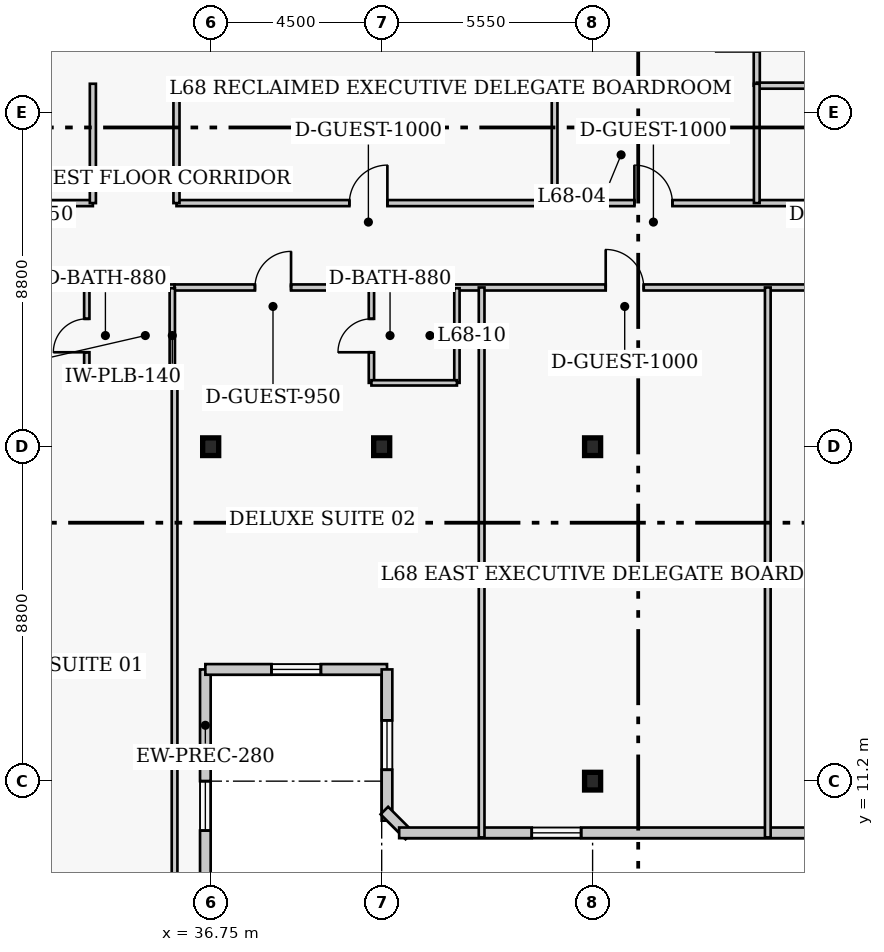
"""IFC4 building model, lengths in metres.
Left out: names, types, materials, properties, quantities, classifications, styles, units other than length and angle.
Written with IfcOpenShell. Run it as: python <this file> out.ifc"""

import sys

from ifc_helpers import new_model, si_unit, direction, frame, frame_2d, origin, origin_2d, place, context, subcontext, project, spatial, rectangle, i_section, extrude, element, fill, save


model = new_model("IFC4")
c1 = context("Model", 3, precision=1e-05, world=origin(), true_north=direction((0.0, 1.0)))
c2 = subcontext(c1, "Body", "Model", "MODEL_VIEW")
j1 = project(units=[si_unit("LENGTHUNIT", "METRE"), si_unit("PLANEANGLEUNIT", "RADIAN")], contexts=[c1])
p1 = place(None, origin())
s1 = spatial("IfcSite", under=j1, at=p1, CompositionType="ELEMENT")
p2 = place(p1, origin())
s2 = spatial("IfcBuilding", under=s1, at=p2, CompositionType="ELEMENT")
p3 = place(p2, frame((0.0, 0.0, 273.4)))
s3 = spatial("IfcBuildingStorey", under=s2, at=p3, CompositionType="ELEMENT", Elevation=273.4)
for number, where, z_axis, x_axis in (
    (1, (36.75, 20.0, 0.0), (0.0, 0.0, 1.0), (1.0, 0.0, 0.0)),
    (2, (41.25, 20.0, 0.0), (0.0, 0.0, 1.0), (1.0, 0.0, 0.0)),
    (3, (46.8, 11.2, 0.0), (0.0, 0.0, 1.0), (1.0, 0.0, 0.0)),
    (4, (46.8, 20.0, 0.0), (0.0, 0.0, 1.0), (1.0, 0.0, 0.0)),
):
    element("IfcColumn", number, at=place(p3, frame(where, z_axis=z_axis, x_axis=x_axis)), inside=s3, PredefinedType="COLUMN", context=c2, shape_type="SweptSolid", body=[
        extrude(i_section(OverallWidth=0.422, OverallDepth=0.465, WebThickness=0.045, FlangeThickness=0.073, FilletRadius=0.017, at=origin_2d()), origin(), (0.0, 0.0, 1.0), 4.0),
    ])
p4 = place(p3, frame((36.61, 6.96, 0.0), z_axis=(0.0, 0.0, 1.0), x_axis=(0.0, 1.0, 0.0)))
e5 = element("IfcWall", 5, at=p4, inside=s3, PredefinedType="SOLIDWALL", context=c2, shape_type="SweptSolid", body=[
    extrude(rectangle(XDim=7.18, YDim=0.28, at=frame_2d((3.59, 0.0))), origin(), (0.0, 0.0, 1.0), 3.76),
])
p5 = place(p4, frame((2.94, 0.0, 0.85)))
e6 = element("IfcOpeningElement", 6, at=p5, cuts=e5, PredefinedType="OPENING", context=c2, shape_type="SweptSolid", body=[
    extrude(rectangle(XDim=1.3, YDim=1.7, at=frame_2d((0.65, 0.85))), frame((0.0, 0.15, 0.0), z_axis=(0.0, -1.0, 0.0), x_axis=(1.0, 0.0, 0.0)), (0.0, 0.0, 1.0), 0.3),
])
p6 = place(p3, frame((36.61, 14.14, 0.0), z_axis=(0.0, 0.0, 1.0), x_axis=(1.0, 0.0, 0.0)))
e7 = element("IfcWall", 7, at=p6, inside=s3, PredefinedType="SOLIDWALL", context=c2, shape_type="SweptSolid", body=[
    extrude(rectangle(XDim=4.78, YDim=0.28, at=frame_2d((2.39, 0.0))), origin(), (0.0, 0.0, 1.0), 3.76),
])
p7 = place(p6, frame((1.74, 0.0, 0.85)))
e8 = element("IfcOpeningElement", 8, at=p7, cuts=e7, PredefinedType="OPENING", context=c2, shape_type="SweptSolid", body=[
    extrude(rectangle(XDim=1.3, YDim=1.7, at=frame_2d((0.65, 0.85))), frame((0.0, 0.15, 0.0), z_axis=(0.0, -1.0, 0.0), x_axis=(1.0, 0.0, 0.0)), (0.0, 0.0, 1.0), 0.3),
])
p8 = place(p3, frame((41.39, 14.14, 0.0), z_axis=(0.0, 0.0, 1.0), x_axis=(0.0, -1.0, 0.0)))
e9 = element("IfcWall", 9, at=p8, inside=s3, PredefinedType="SOLIDWALL", context=c2, shape_type="SweptSolid", body=[
    extrude(rectangle(XDim=3.98, YDim=0.28, at=frame_2d((1.99, 0.0))), origin(), (0.0, 0.0, 1.0), 3.76),
])
p9 = place(p8, frame((1.34, 0.0, 0.85)))
e10 = element("IfcOpeningElement", 10, at=p9, cuts=e9, PredefinedType="OPENING", context=c2, shape_type="SweptSolid", body=[
    extrude(rectangle(XDim=1.3, YDim=1.7, at=frame_2d((0.65, 0.85))), frame((0.0, 0.15, 0.0), z_axis=(0.0, -1.0, 0.0), x_axis=(1.0, 0.0, 0.0)), (0.0, 0.0, 1.0), 0.3),
])
p10 = place(p3, frame((41.321, 10.427, 0.0), z_axis=(0.0, 0.0, 1.0), x_axis=(0.707106781187, -0.707106781187, 0.0)))
e11 = element("IfcWall", 11, at=p10, inside=s3, PredefinedType="SOLIDWALL", context=c2, shape_type="SweptSolid", body=[
    extrude(rectangle(XDim=0.928, YDim=0.28, at=frame_2d((0.464, 0.0))), origin(), (0.0, 0.0, 1.0), 3.76),
])
p11 = place(p3, frame((41.71, 9.84, 0.0), z_axis=(0.0, 0.0, 1.0), x_axis=(1.0, 0.0, 0.0)))
e12 = element("IfcWall", 12, at=p11, inside=s3, PredefinedType="SOLIDWALL", context=c2, shape_type="SweptSolid", body=[
    extrude(rectangle(XDim=24.83, YDim=0.28, at=frame_2d((12.415, 0.0))), origin(), (0.0, 0.0, 1.0), 3.76),
])
p12 = place(p11, frame((3.488, 0.0, 0.85)))
e13 = element("IfcOpeningElement", 13, at=p12, cuts=e12, PredefinedType="OPENING", context=c2, shape_type="SweptSolid", body=[
    extrude(rectangle(XDim=1.3, YDim=1.7, at=frame_2d((0.65, 0.85))), frame((0.0, 0.15, 0.0), z_axis=(0.0, -1.0, 0.0), x_axis=(1.0, 0.0, 0.0)), (0.0, 0.0, 1.0), 0.3),
])
p13 = place(p11, frame((11.115, 0.0, 0.85)))
e14 = element("IfcOpeningElement", 14, at=p13, cuts=e12, PredefinedType="OPENING", context=c2, shape_type="SweptSolid", body=[
    extrude(rectangle(XDim=1.3, YDim=1.7, at=frame_2d((0.65, 0.85))), frame((0.0, 0.15, 0.0), z_axis=(0.0, -1.0, 0.0), x_axis=(1.0, 0.0, 0.0)), (0.0, 0.0, 1.0), 0.3),
])
p14 = place(p11, frame((18.892, 0.0, 0.85)))
e15 = element("IfcOpeningElement", 15, at=p14, cuts=e12, PredefinedType="OPENING", context=c2, shape_type="SweptSolid", body=[
    extrude(rectangle(XDim=1.3, YDim=1.7, at=frame_2d((0.65, 0.85))), frame((0.0, 0.15, 0.0), z_axis=(0.0, -1.0, 0.0), x_axis=(1.0, 0.0, 0.0)), (0.0, 0.0, 1.0), 0.3),
])
p15 = place(p3, frame((51.12, 29.5, 0.0), z_axis=(0.0, 0.0, 1.0), x_axis=(0.0, 1.0, 0.0)))
e16 = element("IfcWall", 16, at=p15, inside=s3, PredefinedType="PARTITIONING", context=c2, shape_type="SweptSolid", body=[
    extrude(rectangle(XDim=3.7, YDim=0.16, at=frame_2d((1.85, 0.0))), origin(), (0.0, 0.0, 1.0), 3.76),
])
p16 = place(p15, frame((0.9, 0.0, 0.0)))
e17 = element("IfcOpeningElement", 17, at=p16, cuts=e16, PredefinedType="OPENING", context=c2, shape_type="SweptSolid", body=[
    extrude(rectangle(XDim=1.1, YDim=2.15, at=frame_2d((0.55, 1.075))), frame((0.0, 0.09, 0.0), z_axis=(0.0, -1.0, 0.0), x_axis=(1.0, 0.0, 0.0)), (0.0, 0.0, 1.0), 0.18),
])
p17 = place(p3, frame((51.12, 29.5, 0.0), z_axis=(0.0, 0.0, 1.0), x_axis=(1.0, 0.0, 0.0)))
e18 = element("IfcWall", 18, at=p17, inside=s3, PredefinedType="PARTITIONING", context=c2, shape_type="SweptSolid", body=[
    extrude(rectangle(XDim=5.63, YDim=0.16, at=frame_2d((2.815, 0.0))), origin(), (0.0, 0.0, 1.0), 3.76),
])
p18 = place(p3, frame((20.4, 26.41, 0.0), z_axis=(0.0, 0.0, 1.0), x_axis=(1.0, 0.0, 0.0)))
e19 = element("IfcWall", 19, at=p18, inside=s3, PredefinedType="PARTITIONING", context=c2, shape_type="SweptSolid", body=[
    extrude(rectangle(XDim=13.25, YDim=0.16, at=frame_2d((6.625, 0.0))), origin(), (0.0, 0.0, 1.0), 3.76),
])
p19 = place(p18, frame((6.25, 0.0, 0.0)))
e20 = element("IfcOpeningElement", 20, at=p19, cuts=e19, PredefinedType="OPENING", context=c2, shape_type="SweptSolid", body=[
    extrude(rectangle(XDim=1.0, YDim=2.15, at=frame_2d((0.5, 1.075))), frame((0.0, 0.09, 0.0), z_axis=(0.0, -1.0, 0.0), x_axis=(1.0, 0.0, 0.0)), (0.0, 0.0, 1.0), 0.18),
])
p20 = place(p3, frame((35.85, 26.41, 0.0), z_axis=(0.0, 0.0, 1.0), x_axis=(1.0, 0.0, 0.0)))
e21 = element("IfcWall", 21, at=p20, inside=s3, PredefinedType="PARTITIONING", context=c2, shape_type="SweptSolid", body=[
    extrude(rectangle(XDim=22.6, YDim=0.16, at=frame_2d((11.3, 0.0))), origin(), (0.0, 0.0, 1.0), 3.76),
])
p21 = place(p20, frame((4.55, 0.0, 0.0)))
e22 = element("IfcOpeningElement", 22, at=p21, cuts=e21, PredefinedType="OPENING", context=c2, shape_type="SweptSolid", body=[
    extrude(rectangle(XDim=1.0, YDim=2.15, at=frame_2d((0.5, 1.075))), frame((0.0, 0.09, 0.0), z_axis=(0.0, -1.0, 0.0), x_axis=(1.0, 0.0, 0.0)), (0.0, 0.0, 1.0), 0.18),
])
p22 = place(p20, frame((12.05, 0.0, 0.0)))
e23 = element("IfcOpeningElement", 23, at=p22, cuts=e21, PredefinedType="OPENING", context=c2, shape_type="SweptSolid", body=[
    extrude(rectangle(XDim=1.0, YDim=2.15, at=frame_2d((0.5, 1.075))), frame((0.0, 0.09, 0.0), z_axis=(0.0, -1.0, 0.0), x_axis=(1.0, 0.0, 0.0)), (0.0, 0.0, 1.0), 0.18),
])
for number, where, z_axis, x_axis in (
    (24, (33.65, 26.41, 0.0), (0.0, 0.0, 1.0), (0.0, 1.0, 0.0)),
    (25, (35.85, 26.41, 0.0), (0.0, 0.0, 1.0), (0.0, 1.0, 0.0)),
):
    element("IfcWall", number, at=place(p3, frame(where, z_axis=z_axis, x_axis=x_axis)), inside=s3, PredefinedType="PARTITIONING", context=c2, shape_type="SweptSolid", body=[
        extrude(rectangle(XDim=3.14, YDim=0.16, at=frame_2d((1.57, 0.0))), origin(), (0.0, 0.0, 1.0), 3.76),
    ])
p23 = place(p3, frame((20.4, 24.19, 0.0), z_axis=(0.0, 0.0, 1.0), x_axis=(1.0, 0.0, 0.0)))
e26 = element("IfcWall", 26, at=p23, inside=s3, PredefinedType="PARTITIONING", context=c2, shape_type="SweptSolid", body=[
    extrude(rectangle(XDim=15.4, YDim=0.16, at=frame_2d((7.7, 0.0))), origin(), (0.0, 0.0, 1.0), 3.76),
])
p24 = place(p23, frame((3.945, 0.0, 0.0)))
e27 = element("IfcOpeningElement", 27, at=p24, cuts=e26, PredefinedType="OPENING", context=c2, shape_type="SweptSolid", body=[
    extrude(rectangle(XDim=1.0, YDim=2.15, at=frame_2d((0.5, 1.075))), frame((0.0, 0.09, 0.0), z_axis=(0.0, -1.0, 0.0), x_axis=(1.0, 0.0, 0.0)), (0.0, 0.0, 1.0), 0.18),
])
p25 = place(p23, frame((10.485, 0.0, 0.0)))
e28 = element("IfcOpeningElement", 28, at=p25, cuts=e26, PredefinedType="OPENING", context=c2, shape_type="SweptSolid", body=[
    extrude(rectangle(XDim=0.95, YDim=2.1, at=frame_2d((0.475, 1.05))), frame((0.0, 0.09, 0.0), z_axis=(0.0, -1.0, 0.0), x_axis=(1.0, 0.0, 0.0)), (0.0, 0.0, 1.0), 0.18),
])
p26 = place(p3, frame((35.8, 24.19, 0.0), z_axis=(0.0, 0.0, 1.0), x_axis=(1.0, 0.0, 0.0)))
e29 = element("IfcWall", 29, at=p26, inside=s3, PredefinedType="PARTITIONING", context=c2, shape_type="SweptSolid", body=[
    extrude(rectangle(XDim=24.81, YDim=0.16, at=frame_2d((12.405, 0.0))), origin(), (0.0, 0.0, 1.0), 3.76),
])
p27 = place(p26, frame((2.115, 0.0, 0.0)))
e30 = element("IfcOpeningElement", 30, at=p27, cuts=e29, PredefinedType="OPENING", context=c2, shape_type="SweptSolid", body=[
    extrude(rectangle(XDim=0.95, YDim=2.1, at=frame_2d((0.475, 1.05))), frame((0.0, 0.09, 0.0), z_axis=(0.0, -1.0, 0.0), x_axis=(1.0, 0.0, 0.0)), (0.0, 0.0, 1.0), 0.18),
])
p28 = place(p26, frame((11.345, 0.0, 0.0)))
e31 = element("IfcOpeningElement", 31, at=p28, cuts=e29, PredefinedType="OPENING", context=c2, shape_type="SweptSolid", body=[
    extrude(rectangle(XDim=1.0, YDim=2.15, at=frame_2d((0.5, 1.075))), frame((0.0, 0.09, 0.0), z_axis=(0.0, -1.0, 0.0), x_axis=(1.0, 0.0, 0.0)), (0.0, 0.0, 1.0), 0.18),
])
p29 = place(p26, frame((17.47, 0.0, 0.0)))
e32 = element("IfcOpeningElement", 32, at=p29, cuts=e29, PredefinedType="OPENING", context=c2, shape_type="SweptSolid", body=[
    extrude(rectangle(XDim=0.95, YDim=2.1, at=frame_2d((0.475, 1.05))), frame((0.0, 0.09, 0.0), z_axis=(0.0, -1.0, 0.0), x_axis=(1.0, 0.0, 0.0)), (0.0, 0.0, 1.0), 0.18),
])
p30 = place(p26, frame((23.265, 0.0, 0.0)))
e33 = element("IfcOpeningElement", 33, at=p30, cuts=e29, PredefinedType="OPENING", context=c2, shape_type="SweptSolid", body=[
    extrude(rectangle(XDim=0.95, YDim=2.1, at=frame_2d((0.475, 1.05))), frame((0.0, 0.09, 0.0), z_axis=(0.0, -1.0, 0.0), x_axis=(1.0, 0.0, 0.0)), (0.0, 0.0, 1.0), 0.18),
])
for number, where, z_axis, x_axis in (
    (34, (45.8, 26.41, 0.0), (0.0, 0.0, 1.0), (0.0, 1.0, 0.0)),
    (35, (51.12, 26.41, 0.0), (0.0, 0.0, 1.0), (0.0, 1.0, 0.0)),
):
    element("IfcWall", number, at=place(p3, frame(where, z_axis=z_axis, x_axis=x_axis)), inside=s3, PredefinedType="PARTITIONING", context=c2, shape_type="SweptSolid", body=[
        extrude(rectangle(XDim=3.14, YDim=0.15, at=frame_2d((1.57, 0.0))), origin(), (0.0, 0.0, 1.0), 3.76),
    ])
p31 = place(p3, frame((33.49, 21.68, 0.0), z_axis=(0.0, 0.0, 1.0), x_axis=(0.0, 1.0, 0.0)))
e36 = element("IfcWall", 36, at=p31, inside=s3, PredefinedType="PLUMBINGWALL", context=c2, shape_type="SweptSolid", body=[
    extrude(rectangle(XDim=2.49, YDim=0.14, at=frame_2d((1.245, 0.0))), origin(), (0.0, 0.0, 1.0), 3.76),
])
p32 = place(p31, frame((0.805, 0.0, 0.0)))
e37 = element("IfcOpeningElement", 37, at=p32, cuts=e36, PredefinedType="OPENING", context=c2, shape_type="SweptSolid", body=[
    extrude(rectangle(XDim=0.88, YDim=2.05, at=frame_2d((0.44, 1.025))), frame((0.0, 0.08, 0.0), z_axis=(0.0, -1.0, 0.0), x_axis=(1.0, 0.0, 0.0)), (0.0, 0.0, 1.0), 0.16),
])
p33 = place(p3, frame((35.74, 21.68, 0.0), z_axis=(0.0, 0.0, 1.0), x_axis=(0.0, 1.0, 0.0)))
e38 = element("IfcWall", 38, at=p33, inside=s3, PredefinedType="PLUMBINGWALL", context=c2, shape_type="SweptSolid", body=[
    extrude(rectangle(XDim=2.49, YDim=0.14, at=frame_2d((1.245, 0.0))), origin(), (0.0, 0.0, 1.0), 3.76),
])
p34 = place(p3, frame((33.49, 21.68, 0.0), z_axis=(0.0, 0.0, 1.0), x_axis=(1.0, 0.0, 0.0)))
e39 = element("IfcWall", 39, at=p34, inside=s3, PredefinedType="PLUMBINGWALL", context=c2, shape_type="SweptSolid", body=[
    extrude(rectangle(XDim=2.25, YDim=0.14, at=frame_2d((1.125, 0.0))), origin(), (0.0, 0.0, 1.0), 3.76),
])
p35 = place(p3, frame((35.8, 6.52, 0.0), z_axis=(0.0, 0.0, 1.0), x_axis=(0.0, 1.0, 0.0)))
e40 = element("IfcWall", 40, at=p35, inside=s3, PredefinedType="PARTITIONING", context=c2, shape_type="SweptSolid", body=[
    extrude(rectangle(XDim=15.16, YDim=0.15, at=frame_2d((7.58, 0.0))), origin(), (0.0, 0.0, 1.0), 3.76),
])
p36 = place(p3, frame((40.98, 21.68, 0.0), z_axis=(0.0, 0.0, 1.0), x_axis=(0.0, 1.0, 0.0)))
e41 = element("IfcWall", 41, at=p36, inside=s3, PredefinedType="PLUMBINGWALL", context=c2, shape_type="SweptSolid", body=[
    extrude(rectangle(XDim=2.49, YDim=0.14, at=frame_2d((1.245, 0.0))), origin(), (0.0, 0.0, 1.0), 3.76),
])
p37 = place(p36, frame((0.805, 0.0, 0.0)))
e42 = element("IfcOpeningElement", 42, at=p37, cuts=e41, PredefinedType="OPENING", context=c2, shape_type="SweptSolid", body=[
    extrude(rectangle(XDim=0.88, YDim=2.05, at=frame_2d((0.44, 1.025))), frame((0.0, 0.08, 0.0), z_axis=(0.0, -1.0, 0.0), x_axis=(1.0, 0.0, 0.0)), (0.0, 0.0, 1.0), 0.16),
])
p38 = place(p3, frame((43.23, 21.68, 0.0), z_axis=(0.0, 0.0, 1.0), x_axis=(0.0, 1.0, 0.0)))
e43 = element("IfcWall", 43, at=p38, inside=s3, PredefinedType="PLUMBINGWALL", context=c2, shape_type="SweptSolid", body=[
    extrude(rectangle(XDim=2.49, YDim=0.14, at=frame_2d((1.245, 0.0))), origin(), (0.0, 0.0, 1.0), 3.76),
])
p39 = place(p3, frame((40.98, 21.68, 0.0), z_axis=(0.0, 0.0, 1.0), x_axis=(1.0, 0.0, 0.0)))
e44 = element("IfcWall", 44, at=p39, inside=s3, PredefinedType="PLUMBINGWALL", context=c2, shape_type="SweptSolid", body=[
    extrude(rectangle(XDim=2.25, YDim=0.14, at=frame_2d((1.125, 0.0))), origin(), (0.0, 0.0, 1.0), 3.76),
])
for number, where, z_axis, x_axis in (
    (45, (43.88, 9.72, 0.0), (0.0, 0.0, 1.0), (0.0, 1.0, 0.0)),
    (46, (51.41, 9.72, 0.0), (0.0, 0.0, 1.0), (0.0, 1.0, 0.0)),
):
    element("IfcWall", number, at=place(p3, frame(where, z_axis=z_axis, x_axis=x_axis)), inside=s3, PredefinedType="PARTITIONING", context=c2, shape_type="SweptSolid", body=[
        extrude(rectangle(XDim=14.47, YDim=0.15, at=frame_2d((7.235, 0.0))), origin(), (0.0, 0.0, 1.0), 3.76),
    ])
p40 = place(p5, origin())
e47 = element("IfcWindow", 47, at=p40, inside=s3, PartitioningType="SINGLE_PANEL", PredefinedType="WINDOW", context=c2, shape_type="SweptSolid", body=[
    extrude(rectangle(XDim=1.3, YDim=1.7, at=frame_2d((0.65, 0.85))), frame((0.0, 0.03, 0.0), z_axis=(0.0, -1.0, 0.0), x_axis=(1.0, 0.0, 0.0)), (0.0, 0.0, 1.0), 0.06),
])
fill(e6, e47)
p41 = place(p7, origin())
e48 = element("IfcWindow", 48, at=p41, inside=s3, PartitioningType="SINGLE_PANEL", PredefinedType="WINDOW", context=c2, shape_type="SweptSolid", body=[
    extrude(rectangle(XDim=1.3, YDim=1.7, at=frame_2d((0.65, 0.85))), frame((0.0, 0.03, 0.0), z_axis=(0.0, -1.0, 0.0), x_axis=(1.0, 0.0, 0.0)), (0.0, 0.0, 1.0), 0.06),
])
fill(e8, e48)
p42 = place(p9, origin())
e49 = element("IfcWindow", 49, at=p42, inside=s3, PartitioningType="SINGLE_PANEL", PredefinedType="WINDOW", context=c2, shape_type="SweptSolid", body=[
    extrude(rectangle(XDim=1.3, YDim=1.7, at=frame_2d((0.65, 0.85))), frame((0.0, 0.03, 0.0), z_axis=(0.0, -1.0, 0.0), x_axis=(1.0, 0.0, 0.0)), (0.0, 0.0, 1.0), 0.06),
])
fill(e10, e49)
p43 = place(p12, origin())
e50 = element("IfcWindow", 50, at=p43, inside=s3, PartitioningType="SINGLE_PANEL", PredefinedType="WINDOW", context=c2, shape_type="SweptSolid", body=[
    extrude(rectangle(XDim=1.3, YDim=1.7, at=frame_2d((0.65, 0.85))), frame((0.0, 0.03, 0.0), z_axis=(0.0, -1.0, 0.0), x_axis=(1.0, 0.0, 0.0)), (0.0, 0.0, 1.0), 0.06),
])
fill(e13, e50)
p44 = place(p21, origin())
e51 = element("IfcDoor", 51, at=p44, inside=s3, OperationType="SINGLE_SWING_RIGHT", PredefinedType="DOOR", context=c2, shape_type="SweptSolid", body=[
    extrude(rectangle(XDim=1.0, YDim=2.15, at=frame_2d((0.5, 1.075))), frame((0.0, 0.025, 0.0), z_axis=(0.0, -1.0, 0.0), x_axis=(1.0, 0.0, 0.0)), (0.0, 0.0, 1.0), 0.05),
])
fill(e22, e51)
p45 = place(p22, origin())
e52 = element("IfcDoor", 52, at=p45, inside=s3, OperationType="SINGLE_SWING_LEFT", PredefinedType="DOOR", context=c2, shape_type="SweptSolid", body=[
    extrude(rectangle(XDim=1.0, YDim=2.15, at=frame_2d((0.5, 1.075))), frame((0.0, 0.025, 0.0), z_axis=(0.0, -1.0, 0.0), x_axis=(1.0, 0.0, 0.0)), (0.0, 0.0, 1.0), 0.05),
])
fill(e23, e52)
p46 = place(p32, origin())
e53 = element("IfcDoor", 53, at=p46, inside=s3, OperationType="SINGLE_SWING_LEFT", PredefinedType="DOOR", context=c2, shape_type="SweptSolid", body=[
    extrude(rectangle(XDim=0.88, YDim=2.05, at=frame_2d((0.44, 1.025))), frame((0.0, 0.025, 0.0), z_axis=(0.0, -1.0, 0.0), x_axis=(1.0, 0.0, 0.0)), (0.0, 0.0, 1.0), 0.05),
])
fill(e37, e53)
p47 = place(p37, origin())
e54 = element("IfcDoor", 54, at=p47, inside=s3, OperationType="SINGLE_SWING_LEFT", PredefinedType="DOOR", context=c2, shape_type="SweptSolid", body=[
    extrude(rectangle(XDim=0.88, YDim=2.05, at=frame_2d((0.44, 1.025))), frame((0.0, 0.025, 0.0), z_axis=(0.0, -1.0, 0.0), x_axis=(1.0, 0.0, 0.0)), (0.0, 0.0, 1.0), 0.05),
])
fill(e42, e54)
p48 = place(p27, origin())
e55 = element("IfcDoor", 55, at=p48, inside=s3, OperationType="SINGLE_SWING_RIGHT", PredefinedType="DOOR", context=c2, shape_type="SweptSolid", body=[
    extrude(rectangle(XDim=0.95, YDim=2.1, at=frame_2d((0.475, 1.05))), frame((0.0, 0.025, 0.0), z_axis=(0.0, -1.0, 0.0), x_axis=(1.0, 0.0, 0.0)), (0.0, 0.0, 1.0), 0.05),
])
fill(e30, e55)
p49 = place(p28, origin())
e56 = element("IfcDoor", 56, at=p49, inside=s3, OperationType="SINGLE_SWING_LEFT", PredefinedType="DOOR", context=c2, shape_type="SweptSolid", body=[
    extrude(rectangle(XDim=1.0, YDim=2.15, at=frame_2d((0.5, 1.075))), frame((0.0, 0.025, 0.0), z_axis=(0.0, -1.0, 0.0), x_axis=(1.0, 0.0, 0.0)), (0.0, 0.0, 1.0), 0.05),
])
fill(e31, e56)
save(model, sys.argv[1])
